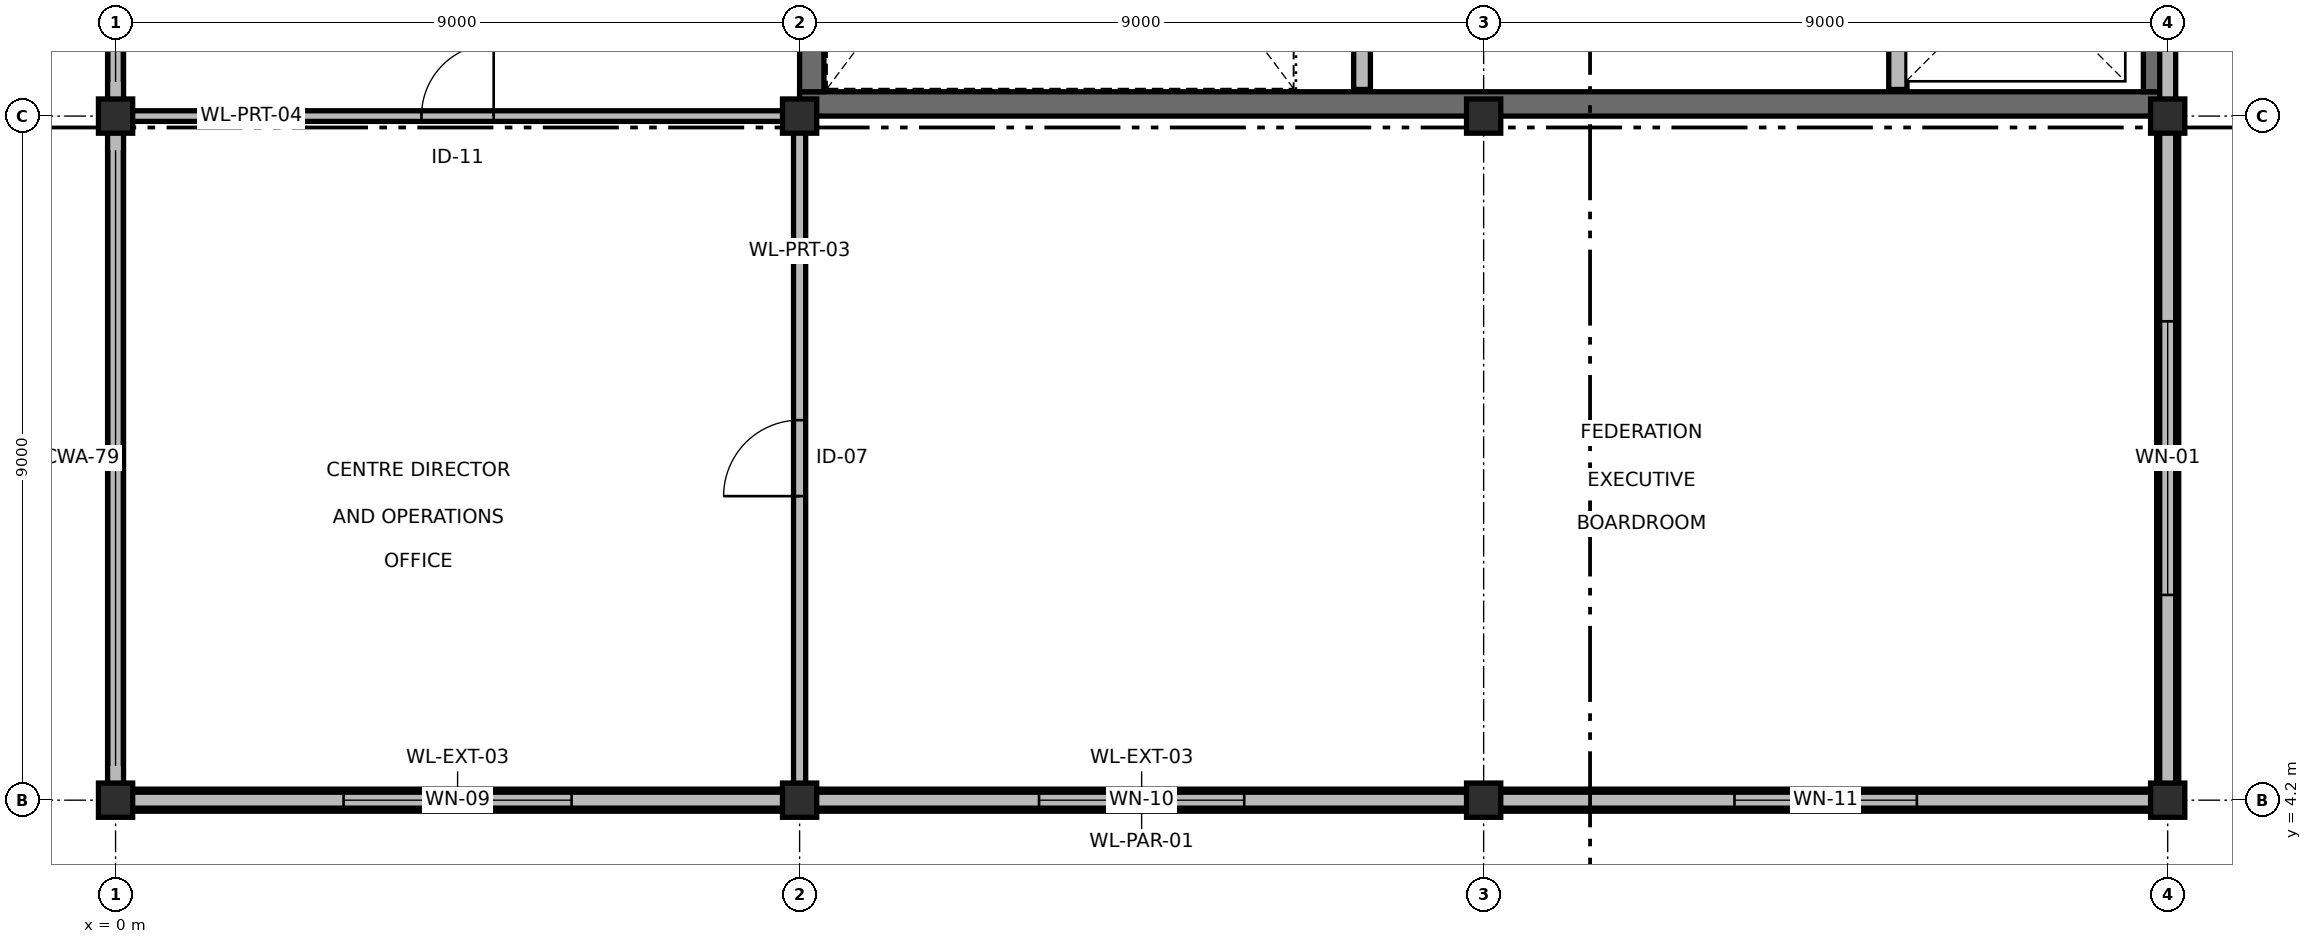
"""IFC4 building model, lengths in metres.
Left out: names, types, materials, properties, quantities, classifications, styles, units other than length and angle.
Written with IfcOpenShell. Run it as: python <this file> out.ifc"""

import sys

from ifc_helpers import new_model, si_unit, direction, frame, frame_2d, origin, origin_2d, place, context, subcontext, project, spatial, rectangle, extrude, element, fill, save


model = new_model("IFC4")
c1 = context("Model", 3, precision=1e-05, world=origin(), true_north=direction((0.0, 1.0)))
c2 = subcontext(c1, "Body", "Model", "MODEL_VIEW")
j1 = project(units=[si_unit("LENGTHUNIT", "METRE"), si_unit("PLANEANGLEUNIT", "RADIAN")], contexts=[c1])
p1 = place(None, origin())
s1 = spatial("IfcSite", under=j1, at=p1, CompositionType="ELEMENT")
p2 = place(p1, origin())
s2 = spatial("IfcBuilding", under=s1, at=p2, CompositionType="ELEMENT")
p3 = place(p2, frame((0.0, 0.0, 18.6)))
s3 = spatial("IfcBuildingStorey", under=s2, at=p3, CompositionType="ELEMENT", Elevation=18.6)
for number, where, z_axis, x_axis in (
    (1, (0.0, 4.2, 0.0), (0.0, 0.0, 1.0), (1.0, 0.0, 0.0)),
    (2, (0.0, 13.2, 0.0), (0.0, 0.0, 1.0), (1.0, 0.0, 0.0)),
    (3, (9.0, 4.2, 0.0), (0.0, 0.0, 1.0), (1.0, 0.0, 0.0)),
    (4, (9.0, 13.2, 0.0), (0.0, 0.0, 1.0), (1.0, 0.0, 0.0)),
    (5, (18.0, 4.2, 0.0), (0.0, 0.0, 1.0), (1.0, 0.0, 0.0)),
    (6, (18.0, 13.2, 0.0), (0.0, 0.0, 1.0), (1.0, 0.0, 0.0)),
    (7, (27.0, 4.2, 0.0), (0.0, 0.0, 1.0), (1.0, 0.0, 0.0)),
    (8, (27.0, 13.2, 0.0), (0.0, 0.0, 1.0), (1.0, 0.0, 0.0)),
):
    element("IfcColumn", number, at=place(p3, frame(where, z_axis=z_axis, x_axis=x_axis)), inside=s3, PredefinedType="COLUMN", context=c2, shape_type="SweptSolid", body=[
        extrude(rectangle(XDim=0.45, YDim=0.45, at=origin_2d()), origin(), (0.0, 0.0, 1.0), 4.2),
    ])
p4 = place(p3, frame((9.0, 13.36, 0.0), z_axis=(0.0, 0.0, 1.0), x_axis=(1.0, 0.0, 0.0)))
e9 = element("IfcWall", 9, at=p4, inside=s3, PredefinedType="SHEAR", context=c2, shape_type="SweptSolid", body=[
    extrude(rectangle(XDim=18.0, YDim=0.32, at=frame_2d((9.0, 0.0))), origin(), (0.0, 0.0, 1.0), 4.2),
])
p5 = place(p3, frame((9.16, 13.52, 0.0), z_axis=(0.0, 0.0, 1.0), x_axis=(0.0, 1.0, 0.0)))
e10 = element("IfcWall", 10, at=p5, inside=s3, PredefinedType="SHEAR", context=c2, shape_type="SweptSolid", body=[
    extrude(rectangle(XDim=8.36, YDim=0.32, at=frame_2d((4.18, 0.0))), origin(), (0.0, 0.0, 1.0), 4.2),
])
p6 = place(p3, frame((26.84, 13.52, 0.0), z_axis=(0.0, 0.0, 1.0), x_axis=(0.0, 1.0, 0.0)))
e11 = element("IfcWall", 11, at=p6, inside=s3, PredefinedType="SHEAR", context=c2, shape_type="SweptSolid", body=[
    extrude(rectangle(XDim=8.48, YDim=0.32, at=frame_2d((4.24, 0.0))), origin(), (0.0, 0.0, 1.0), 4.2),
])
p7 = place(p3, frame((8.77, 4.2, 0.0), z_axis=(0.0, 0.0, 1.0), x_axis=(-1.0, 0.0, 0.0)))
e12 = element("IfcWall", 12, at=p7, inside=s3, PredefinedType="SOLIDWALL", context=c2, shape_type="SweptSolid", body=[
    extrude(rectangle(XDim=8.54, YDim=0.29, at=frame_2d((4.27, 0.0))), origin(), (0.0, 0.0, 1.0), 3.25),
])
p8 = place(p7, frame((2.77, 0.0, 0.95)))
e13 = element("IfcOpeningElement", 13, at=p8, cuts=e12, PredefinedType="OPENING", context=c2, shape_type="SweptSolid", body=[
    extrude(rectangle(XDim=3.0, YDim=1.5, at=frame_2d((1.5, 0.75))), frame((0.0, 0.155, 0.0), z_axis=(0.0, -1.0, 0.0), x_axis=(1.0, 0.0, 0.0)), (0.0, 0.0, 1.0), 0.31),
])
p9 = place(p3, frame((17.77, 4.2, 0.0), z_axis=(0.0, 0.0, 1.0), x_axis=(-1.0, 0.0, 0.0)))
e14 = element("IfcWall", 14, at=p9, inside=s3, PredefinedType="SOLIDWALL", context=c2, shape_type="SweptSolid", body=[
    extrude(rectangle(XDim=8.54, YDim=0.29, at=frame_2d((4.27, 0.0))), origin(), (0.0, 0.0, 1.0), 3.25),
])
p10 = place(p9, frame((2.92, 0.0, 0.95)))
e15 = element("IfcOpeningElement", 15, at=p10, cuts=e14, PredefinedType="OPENING", context=c2, shape_type="SweptSolid", body=[
    extrude(rectangle(XDim=2.7, YDim=1.5, at=frame_2d((1.35, 0.75))), frame((0.0, 0.155, 0.0), z_axis=(0.0, -1.0, 0.0), x_axis=(1.0, 0.0, 0.0)), (0.0, 0.0, 1.0), 0.31),
])
p11 = place(p3, frame((26.77, 4.2, 0.0), z_axis=(0.0, 0.0, 1.0), x_axis=(-1.0, 0.0, 0.0)))
e16 = element("IfcWall", 16, at=p11, inside=s3, PredefinedType="SOLIDWALL", context=c2, shape_type="SweptSolid", body=[
    extrude(rectangle(XDim=8.54, YDim=0.29, at=frame_2d((4.27, 0.0))), origin(), (0.0, 0.0, 1.0), 3.25),
])
p12 = place(p11, frame((3.07, 0.0, 0.95)))
e17 = element("IfcOpeningElement", 17, at=p12, cuts=e16, PredefinedType="OPENING", context=c2, shape_type="SweptSolid", body=[
    extrude(rectangle(XDim=2.4, YDim=1.5, at=frame_2d((1.2, 0.75))), frame((0.0, 0.155, 0.0), z_axis=(0.0, -1.0, 0.0), x_axis=(1.0, 0.0, 0.0)), (0.0, 0.0, 1.0), 0.31),
])
p13 = place(p3, frame((27.0, 12.97, 0.0), z_axis=(0.0, 0.0, 1.0), x_axis=(0.0, -1.0, 0.0)))
e18 = element("IfcWall", 18, at=p13, inside=s3, PredefinedType="SOLIDWALL", context=c2, shape_type="SweptSolid", body=[
    extrude(rectangle(XDim=8.54, YDim=0.29, at=frame_2d((4.27, 0.0))), origin(), (0.0, 0.0, 1.0), 3.25),
])
p14 = place(p13, frame((2.47, 0.0, 0.95)))
e19 = element("IfcOpeningElement", 19, at=p14, cuts=e18, PredefinedType="OPENING", context=c2, shape_type="SweptSolid", body=[
    extrude(rectangle(XDim=3.6, YDim=0.9, at=frame_2d((1.8, 0.45))), frame((0.0, 0.155, 0.0), z_axis=(0.0, -1.0, 0.0), x_axis=(1.0, 0.0, 0.0)), (0.0, 0.0, 1.0), 0.31),
])
p15 = place(p3, frame((0.0, 4.2, 4.2), z_axis=(0.0, 0.0, 1.0), x_axis=(1.0, 0.0, 0.0)))
e20 = element("IfcWall", 20, at=p15, inside=s3, PredefinedType="PARAPET", context=c2, shape_type="SweptSolid", body=[
    extrude(rectangle(XDim=27.0, YDim=0.21, at=frame_2d((13.5, 0.0))), origin(), (0.0, 0.0, 1.0), 1.15),
])
for number, where, z_axis, x_axis in (
    (21, (27.0, 4.31, 4.2), (0.0, 0.0, 1.0), (0.0, 1.0, 0.0)),
    (22, (0.0, 68.29, 4.2), (0.0, 0.0, 1.0), (0.0, -1.0, 0.0)),
):
    element("IfcWall", number, at=place(p3, frame(where, z_axis=z_axis, x_axis=x_axis)), inside=s3, PredefinedType="PARAPET", context=c2, shape_type="SweptSolid", body=[
        extrude(rectangle(XDim=63.98, YDim=0.21, at=frame_2d((31.99, 0.0))), origin(), (0.0, 0.0, 1.0), 1.15),
    ])
p16 = place(p3, frame((16.4, 13.55, 0.0), z_axis=(0.0, 0.0, 1.0), x_axis=(0.0, 1.0, 0.0)))
e23 = element("IfcWall", 23, at=p16, inside=s3, PredefinedType="PARTITIONING", context=c2, shape_type="SweptSolid", body=[
    extrude(rectangle(XDim=3.25, YDim=0.22, at=frame_2d((1.625, 0.0))), origin(), (0.0, 0.0, 1.0), 3.305),
])
p17 = place(p3, frame((23.45, 13.55, 0.0), z_axis=(0.0, 0.0, 1.0), x_axis=(0.0, 1.0, 0.0)))
e24 = element("IfcWall", 24, at=p17, inside=s3, PredefinedType="SOLIDWALL", context=c2, shape_type="SweptSolid", body=[
    extrude(rectangle(XDim=2.95, YDim=0.24, at=frame_2d((1.475, 0.0))), origin(), (0.0, 0.0, 1.0), 3.305),
])
p18 = place(p3, frame((9.0, 4.2, 0.0), z_axis=(0.0, 0.0, 1.0), x_axis=(0.0, 1.0, 0.0)))
e25 = element("IfcWall", 25, at=p18, inside=s3, PredefinedType="PARTITIONING", context=c2, shape_type="SweptSolid", body=[
    extrude(rectangle(XDim=9.0, YDim=0.16, at=frame_2d((4.5, 0.0))), origin(), (0.0, 0.0, 1.0), 3.255),
])
p19 = place(p18, frame((4.0, 0.0, 0.0)))
e26 = element("IfcOpeningElement", 26, at=p19, cuts=e25, PredefinedType="OPENING", context=c2, shape_type="SweptSolid", body=[
    extrude(rectangle(XDim=1.0, YDim=2.1, at=frame_2d((0.5, 1.05))), frame((0.0, 0.09, 0.0), z_axis=(0.0, -1.0, 0.0), x_axis=(1.0, 0.0, 0.0)), (0.0, 0.0, 1.0), 0.18),
])
p20 = place(p3, frame((0.0, 13.2, 0.0), z_axis=(0.0, 0.0, 1.0), x_axis=(1.0, 0.0, 0.0)))
e27 = element("IfcWall", 27, at=p20, inside=s3, PredefinedType="PARTITIONING", context=c2, shape_type="SweptSolid", body=[
    extrude(rectangle(XDim=9.0, YDim=0.14, at=frame_2d((4.5, 0.0))), origin(), (0.0, 0.0, 1.0), 3.255),
])
p21 = place(p20, frame((4.025, 0.0, 0.0)))
e28 = element("IfcOpeningElement", 28, at=p21, cuts=e27, PredefinedType="OPENING", context=c2, shape_type="SweptSolid", body=[
    extrude(rectangle(XDim=0.95, YDim=2.1, at=frame_2d((0.475, 1.05))), frame((0.0, 0.08, 0.0), z_axis=(0.0, -1.0, 0.0), x_axis=(1.0, 0.0, 0.0)), (0.0, 0.0, 1.0), 0.16),
])
p22 = place(p8, origin())
e29 = element("IfcWindow", 29, at=p22, inside=s3, PartitioningType="SINGLE_PANEL", PredefinedType="WINDOW", context=c2, shape_type="SweptSolid", body=[
    extrude(rectangle(XDim=3.0, YDim=1.5, at=frame_2d((1.5, 0.75))), frame((0.0, 0.03, 0.0), z_axis=(0.0, -1.0, 0.0), x_axis=(1.0, 0.0, 0.0)), (0.0, 0.0, 1.0), 0.06),
])
fill(e13, e29)
p23 = place(p10, origin())
e30 = element("IfcWindow", 30, at=p23, inside=s3, PartitioningType="SINGLE_PANEL", PredefinedType="WINDOW", context=c2, shape_type="SweptSolid", body=[
    extrude(rectangle(XDim=2.7, YDim=1.5, at=frame_2d((1.35, 0.75))), frame((0.0, 0.03, 0.0), z_axis=(0.0, -1.0, 0.0), x_axis=(1.0, 0.0, 0.0)), (0.0, 0.0, 1.0), 0.06),
])
fill(e15, e30)
p24 = place(p12, origin())
e31 = element("IfcWindow", 31, at=p24, inside=s3, PartitioningType="SINGLE_PANEL", PredefinedType="WINDOW", context=c2, shape_type="SweptSolid", body=[
    extrude(rectangle(XDim=2.4, YDim=1.5, at=frame_2d((1.2, 0.75))), frame((0.0, 0.03, 0.0), z_axis=(0.0, -1.0, 0.0), x_axis=(1.0, 0.0, 0.0)), (0.0, 0.0, 1.0), 0.06),
])
fill(e17, e31)
p25 = place(p14, origin())
e32 = element("IfcWindow", 32, at=p25, inside=s3, PartitioningType="SINGLE_PANEL", PredefinedType="WINDOW", context=c2, shape_type="SweptSolid", body=[
    extrude(rectangle(XDim=3.6, YDim=0.9, at=frame_2d((1.8, 0.45))), frame((0.0, 0.03, 0.0), z_axis=(0.0, -1.0, 0.0), x_axis=(1.0, 0.0, 0.0)), (0.0, 0.0, 1.0), 0.06),
])
fill(e19, e32)
p26 = place(p19, origin())
e33 = element("IfcDoor", 33, at=p26, inside=s3, OperationType="SINGLE_SWING_LEFT", PredefinedType="DOOR", context=c2, shape_type="SweptSolid", body=[
    extrude(rectangle(XDim=1.0, YDim=2.1, at=frame_2d((0.5, 1.05))), frame((0.0, 0.025, 0.0), z_axis=(0.0, -1.0, 0.0), x_axis=(1.0, 0.0, 0.0)), (0.0, 0.0, 1.0), 0.05),
])
fill(e26, e33)
p27 = place(p21, origin())
e34 = element("IfcDoor", 34, at=p27, inside=s3, OperationType="SINGLE_SWING_RIGHT", PredefinedType="DOOR", context=c2, shape_type="SweptSolid", body=[
    extrude(rectangle(XDim=0.95, YDim=2.1, at=frame_2d((0.475, 1.05))), frame((0.0, 0.025, 0.0), z_axis=(0.0, -1.0, 0.0), x_axis=(1.0, 0.0, 0.0)), (0.0, 0.0, 1.0), 0.05),
])
fill(e28, e34)
save(model, sys.argv[1])
